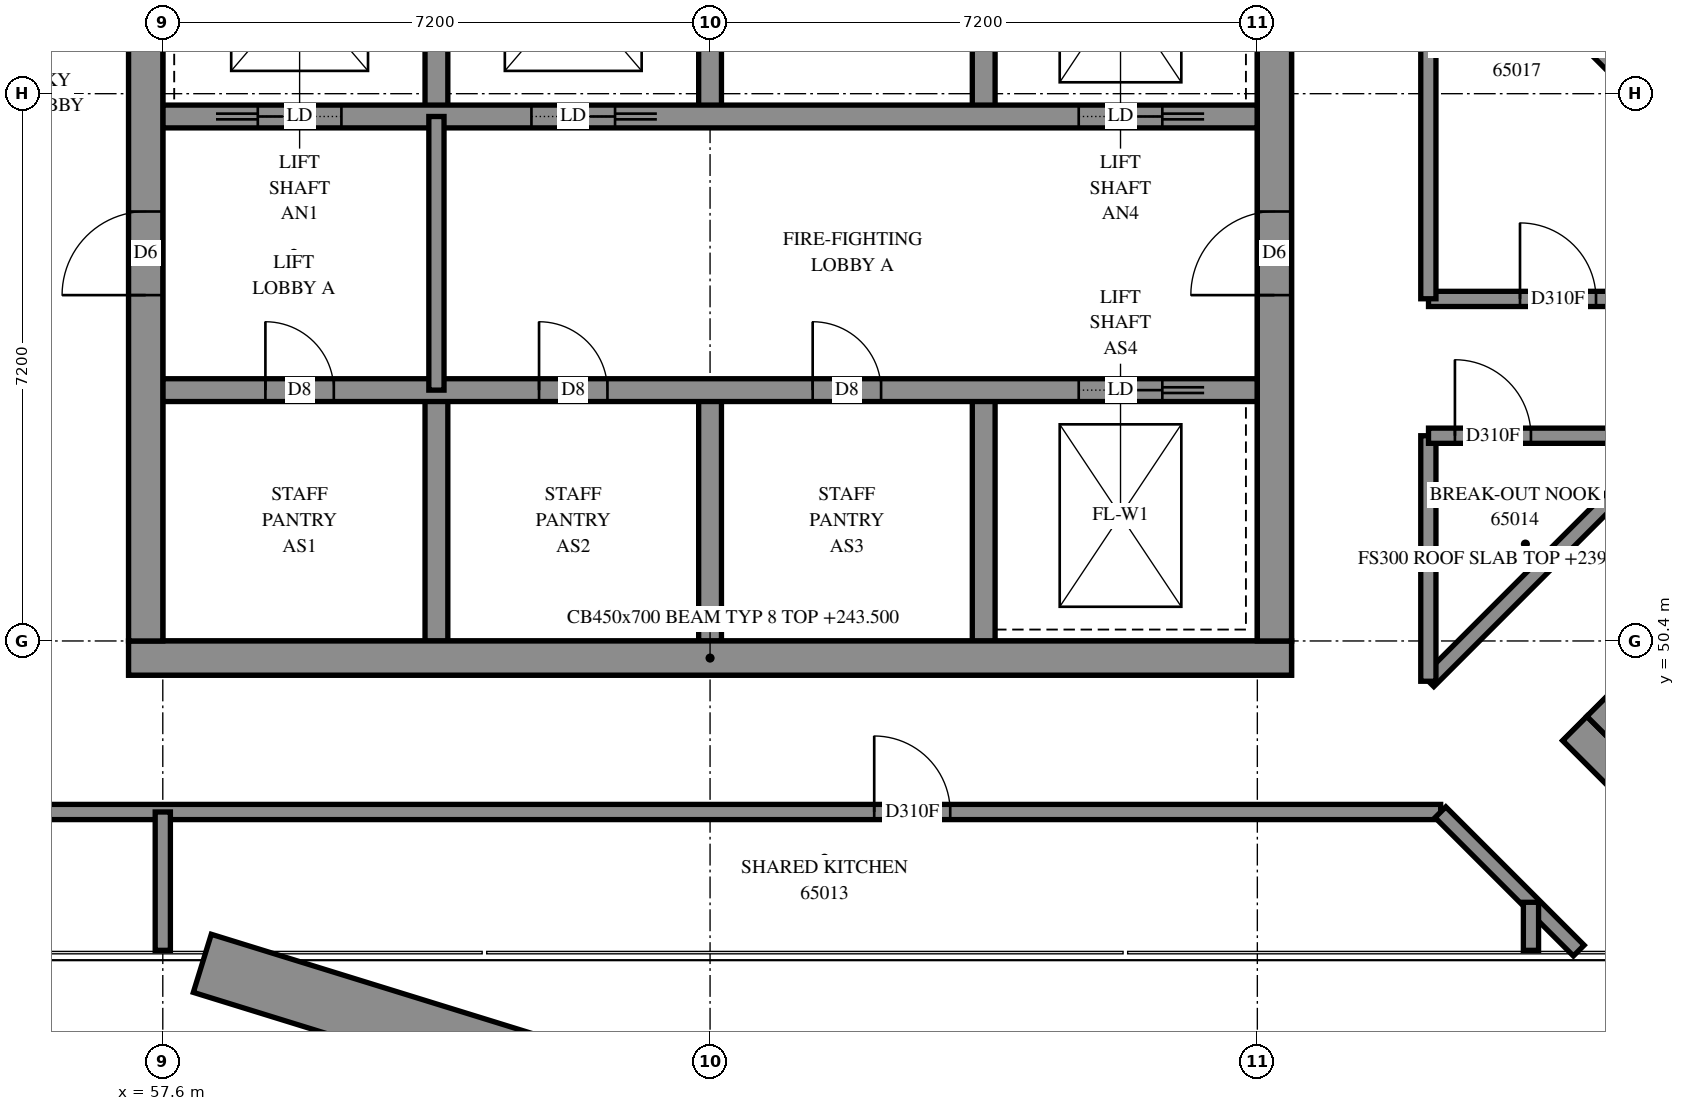
"""IFC4 building model, lengths in metres.
Left out: names, types, materials, properties, quantities, classifications, styles, units other than length and angle.
Written with IfcOpenShell. Run it as: python <this file> out.ifc"""

import sys

from ifc_helpers import new_model, si_unit, direction, frame, frame_2d, origin, place, context, subcontext, project, spatial, rectangle, extrude, element, fill, save


model = new_model("IFC4")
c1 = context("Model", 3, precision=1e-05, world=origin(), true_north=direction((0.0, 1.0)))
c2 = subcontext(c1, "Body", "Model", "MODEL_VIEW")
j1 = project(units=[si_unit("LENGTHUNIT", "METRE"), si_unit("PLANEANGLEUNIT", "RADIAN")], contexts=[c1])
p1 = place(None, origin())
s1 = spatial("IfcSite", under=j1, at=p1, CompositionType="ELEMENT")
p2 = place(p1, origin())
s2 = spatial("IfcBuilding", under=s1, at=p2, CompositionType="ELEMENT")
p3 = place(p2, frame((0.0, 0.0, 239.6)))
s3 = spatial("IfcBuildingStorey", under=s2, at=p3, CompositionType="ELEMENT", Elevation=239.6)
p4 = place(p3, frame((57.15, 50.175, -0.3), z_axis=(0.0, 0.0, 1.0), x_axis=(1.0, 0.0, 0.0)))
e1 = element("IfcWall", 1, at=p4, inside=s3, PredefinedType="SHEAR", context=c2, shape_type="SweptSolid", body=[
    extrude(rectangle(XDim=15.3, YDim=0.45, at=frame_2d((7.65, 0.0))), origin(), (0.0, 0.0, 1.0), 3.5),
])
p5 = place(p3, frame((57.375, 50.4, -0.3), z_axis=(0.0, 0.0, 1.0), x_axis=(0.0, 1.0, 0.0)))
e2 = element("IfcWall", 2, at=p5, inside=s3, PredefinedType="SHEAR", context=c2, shape_type="SweptSolid", body=[
    extrude(rectangle(XDim=14.4, YDim=0.45, at=frame_2d((7.2, 0.0))), origin(), (0.0, 0.0, 1.0), 3.5),
])
p6 = place(p5, frame((4.55, 0.0, 0.3)))
e3 = element("IfcOpeningElement", 3, at=p6, cuts=e2, PredefinedType="OPENING", context=c2, shape_type="SweptSolid", body=[
    extrude(rectangle(XDim=1.1, YDim=2.1, at=frame_2d((0.55, 1.05))), frame((0.0, 0.235, 0.0), z_axis=(0.0, -1.0, 0.0), x_axis=(1.0, 0.0, 0.0)), (0.0, 0.0, 1.0), 0.47),
])
p7 = place(p5, frame((11.35, 0.0, 0.3)))
e4 = element("IfcOpeningElement", 4, at=p7, cuts=e2, PredefinedType="OPENING", context=c2, shape_type="SweptSolid", body=[
    extrude(rectangle(XDim=1.1, YDim=2.1, at=frame_2d((0.55, 1.05))), frame((0.0, 0.235, 0.0), z_axis=(0.0, -1.0, 0.0), x_axis=(1.0, 0.0, 0.0)), (0.0, 0.0, 1.0), 0.47),
])
p8 = place(p3, frame((72.225, 50.4, -0.3), z_axis=(0.0, 0.0, 1.0), x_axis=(0.0, 1.0, 0.0)))
e5 = element("IfcWall", 5, at=p8, inside=s3, PredefinedType="SHEAR", context=c2, shape_type="SweptSolid", body=[
    extrude(rectangle(XDim=14.4, YDim=0.45, at=frame_2d((7.2, 0.0))), origin(), (0.0, 0.0, 1.0), 3.5),
])
p9 = place(p8, frame((4.55, 0.0, 0.3)))
e6 = element("IfcOpeningElement", 6, at=p9, cuts=e5, PredefinedType="OPENING", context=c2, shape_type="SweptSolid", body=[
    extrude(rectangle(XDim=1.1, YDim=2.1, at=frame_2d((0.55, 1.05))), frame((0.0, 0.235, 0.0), z_axis=(0.0, -1.0, 0.0), x_axis=(1.0, 0.0, 0.0)), (0.0, 0.0, 1.0), 0.47),
])
p10 = place(p8, frame((11.35, 0.0, 0.3)))
e7 = element("IfcOpeningElement", 7, at=p10, cuts=e5, PredefinedType="OPENING", context=c2, shape_type="SweptSolid", body=[
    extrude(rectangle(XDim=1.1, YDim=2.1, at=frame_2d((0.55, 1.05))), frame((0.0, 0.235, 0.0), z_axis=(0.0, -1.0, 0.0), x_axis=(1.0, 0.0, 0.0)), (0.0, 0.0, 1.0), 0.47),
])
for number, where, z_axis, x_axis in (
    (8, (61.2, 50.4, 0.0), (0.0, 0.0, 1.0), (0.0, 1.0, 0.0)),
    (9, (61.2, 57.3, 0.0), (0.0, 0.0, 1.0), (0.0, 1.0, 0.0)),
    (10, (64.8, 50.4, 0.0), (0.0, 0.0, 1.0), (0.0, 1.0, 0.0)),
    (11, (64.8, 57.3, 0.0), (0.0, 0.0, 1.0), (0.0, 1.0, 0.0)),
    (12, (68.4, 50.4, 0.0), (0.0, 0.0, 1.0), (0.0, 1.0, 0.0)),
    (13, (68.4, 57.3, 0.0), (0.0, 0.0, 1.0), (0.0, 1.0, 0.0)),
):
    element("IfcWall", number, at=place(p3, frame(where, z_axis=z_axis, x_axis=x_axis)), inside=s3, PredefinedType="SOLIDWALL", context=c2, shape_type="SweptSolid", body=[
        extrude(rectangle(XDim=3.3, YDim=0.3, at=frame_2d((1.65, 0.0))), origin(), (0.0, 0.0, 1.0), 3.9),
    ])
p11 = place(p3, frame((57.6, 53.7, 0.0), z_axis=(0.0, 0.0, 1.0), x_axis=(1.0, 0.0, 0.0)))
e14 = element("IfcWall", 14, at=p11, inside=s3, PredefinedType="SOLIDWALL", context=c2, shape_type="SweptSolid", body=[
    extrude(rectangle(XDim=14.4, YDim=0.3, at=frame_2d((7.2, 0.0))), origin(), (0.0, 0.0, 1.0), 3.9),
])
p12 = place(p11, frame((1.35, 0.0, 0.0)))
e15 = element("IfcOpeningElement", 15, at=p12, cuts=e14, PredefinedType="OPENING", context=c2, shape_type="SweptSolid", body=[
    extrude(rectangle(XDim=0.9, YDim=2.1, at=frame_2d((0.45, 1.05))), frame((0.0, 0.16, 0.0), z_axis=(0.0, -1.0, 0.0), x_axis=(1.0, 0.0, 0.0)), (0.0, 0.0, 1.0), 0.32),
])
p13 = place(p11, frame((4.95, 0.0, 0.0)))
e16 = element("IfcOpeningElement", 16, at=p13, cuts=e14, PredefinedType="OPENING", context=c2, shape_type="SweptSolid", body=[
    extrude(rectangle(XDim=0.9, YDim=2.1, at=frame_2d((0.45, 1.05))), frame((0.0, 0.16, 0.0), z_axis=(0.0, -1.0, 0.0), x_axis=(1.0, 0.0, 0.0)), (0.0, 0.0, 1.0), 0.32),
])
p14 = place(p11, frame((8.55, 0.0, 0.0)))
e17 = element("IfcOpeningElement", 17, at=p14, cuts=e14, PredefinedType="OPENING", context=c2, shape_type="SweptSolid", body=[
    extrude(rectangle(XDim=0.9, YDim=2.1, at=frame_2d((0.45, 1.05))), frame((0.0, 0.16, 0.0), z_axis=(0.0, -1.0, 0.0), x_axis=(1.0, 0.0, 0.0)), (0.0, 0.0, 1.0), 0.32),
])
p15 = place(p11, frame((12.05, 0.0, 0.0)))
e18 = element("IfcOpeningElement", 18, at=p15, cuts=e14, PredefinedType="OPENING", context=c2, shape_type="SweptSolid", body=[
    extrude(rectangle(XDim=1.1, YDim=2.1, at=frame_2d((0.55, 1.05))), frame((0.0, 0.16, 0.0), z_axis=(0.0, -1.0, 0.0), x_axis=(1.0, 0.0, 0.0)), (0.0, 0.0, 1.0), 0.32),
])
p16 = place(p3, frame((57.6, 57.3, 0.0), z_axis=(0.0, 0.0, 1.0), x_axis=(1.0, 0.0, 0.0)))
e19 = element("IfcWall", 19, at=p16, inside=s3, PredefinedType="SOLIDWALL", context=c2, shape_type="SweptSolid", body=[
    extrude(rectangle(XDim=14.4, YDim=0.3, at=frame_2d((7.2, 0.0))), origin(), (0.0, 0.0, 1.0), 3.9),
])
p17 = place(p16, frame((1.25, 0.0, 0.0)))
e20 = element("IfcOpeningElement", 20, at=p17, cuts=e19, PredefinedType="OPENING", context=c2, shape_type="SweptSolid", body=[
    extrude(rectangle(XDim=1.1, YDim=2.1, at=frame_2d((0.55, 1.05))), frame((0.0, 0.16, 0.0), z_axis=(0.0, -1.0, 0.0), x_axis=(1.0, 0.0, 0.0)), (0.0, 0.0, 1.0), 0.32),
])
p18 = place(p16, frame((4.85, 0.0, 0.0)))
e21 = element("IfcOpeningElement", 21, at=p18, cuts=e19, PredefinedType="OPENING", context=c2, shape_type="SweptSolid", body=[
    extrude(rectangle(XDim=1.1, YDim=2.1, at=frame_2d((0.55, 1.05))), frame((0.0, 0.16, 0.0), z_axis=(0.0, -1.0, 0.0), x_axis=(1.0, 0.0, 0.0)), (0.0, 0.0, 1.0), 0.32),
])
p19 = place(p16, frame((12.05, 0.0, 0.0)))
e22 = element("IfcOpeningElement", 22, at=p19, cuts=e19, PredefinedType="OPENING", context=c2, shape_type="SweptSolid", body=[
    extrude(rectangle(XDim=1.1, YDim=2.1, at=frame_2d((0.55, 1.05))), frame((0.0, 0.16, 0.0), z_axis=(0.0, -1.0, 0.0), x_axis=(1.0, 0.0, 0.0)), (0.0, 0.0, 1.0), 0.32),
])
p20 = place(p3, frame((76.177, 49.249, -0.3), z_axis=(0.0, 0.0, 1.0), x_axis=(0.7071100491, -0.7071035132, 0.0)))
e23 = element("IfcWall", 23, at=p20, inside=s3, PredefinedType="SHEAR", context=c2, shape_type="SweptSolid", body=[
    extrude(rectangle(XDim=15.3, YDim=0.45, at=frame_2d((7.65, 0.0))), origin(), (0.0, 0.0, 1.0), 3.5),
])
p21 = place(p3, frame((76.495, 49.249, -0.3), z_axis=(0.0, 0.0, 1.0), x_axis=(0.7071067812, 0.7071067812, 0.0)))
e24 = element("IfcWall", 24, at=p21, inside=s3, PredefinedType="SHEAR", context=c2, shape_type="SweptSolid", body=[
    extrude(rectangle(XDim=14.4, YDim=0.45, at=frame_2d((7.2, 0.0))), origin(), (0.0, 0.0, 1.0), 3.5),
])
p22 = place(p21, frame((4.55, 0.0, 0.3)))
e25 = element("IfcOpeningElement", 25, at=p22, cuts=e24, PredefinedType="OPENING", context=c2, shape_type="SweptSolid", body=[
    extrude(rectangle(XDim=1.1, YDim=2.1, at=frame_2d((0.55, 1.05))), frame((0.0, 0.235, 0.0), z_axis=(0.0, -1.0, 0.0), x_axis=(1.0, 0.0, 0.0)), (0.0, 0.0, 1.0), 0.47),
])
p23 = place(p21, frame((11.35, 0.0, 0.3)))
e26 = element("IfcOpeningElement", 26, at=p23, cuts=e24, PredefinedType="OPENING", context=c2, shape_type="SweptSolid", body=[
    extrude(rectangle(XDim=1.1, YDim=2.1, at=frame_2d((0.55, 1.05))), frame((0.0, 0.235, 0.0), z_axis=(0.0, -1.0, 0.0), x_axis=(1.0, 0.0, 0.0)), (0.0, 0.0, 1.0), 0.47),
])
p24 = place(p3, frame((62.8, 44.712, 0.0), z_axis=(0.0, 0.0, 1.0), x_axis=(-0.9553591731, 0.2954468656, 0.0)))
e27 = element("IfcWall", 27, at=p24, inside=s3, PredefinedType="SOLIDWALL", context=c2, shape_type="SweptSolid", body=[
    extrude(rectangle(XDim=4.899, YDim=0.8, at=frame_2d((2.449, 0.0))), origin(), (0.0, 0.0, 1.0), 0.65),
])
p25 = place(p3, frame((61.2, 53.7, 0.0), z_axis=(0.0, 0.0, 1.0), x_axis=(0.0, 1.0, 0.0)))
e28 = element("IfcWall", 28, at=p25, inside=s3, PredefinedType="PARTITIONING", context=c2, shape_type="SweptSolid", body=[
    extrude(rectangle(XDim=3.6, YDim=0.2, at=frame_2d((1.8, 0.0))), origin(), (0.0, 0.0, 1.0), 3.9),
])
p26 = place(p3, frame((55.352, 48.15, 0.0), z_axis=(0.0, 0.0, 1.0), x_axis=(1.0, 0.0, 0.0)))
e29 = element("IfcWall", 29, at=p26, inside=s3, PredefinedType="PARTITIONING", context=c2, shape_type="SweptSolid", body=[
    extrude(rectangle(XDim=19.06, YDim=0.2, at=frame_2d((9.53, 0.0))), origin(), (0.0, 0.0, 1.0), 3.9),
])
p27 = place(p26, frame((11.608, 0.0, 0.0)))
e30 = element("IfcOpeningElement", 30, at=p27, cuts=e29, PredefinedType="OPENING", context=c2, shape_type="SweptSolid", body=[
    extrude(rectangle(XDim=1.0, YDim=2.1, at=frame_2d((0.5, 1.05))), frame((0.0, 0.11, 0.0), z_axis=(0.0, -1.0, 0.0), x_axis=(1.0, 0.0, 0.0)), (0.0, 0.0, 1.0), 0.22),
])
p28 = place(p3, frame((74.252, 54.9, 0.0), z_axis=(0.0, 0.0, 1.0), x_axis=(1.0, 0.0, 0.0)))
e31 = element("IfcWall", 31, at=p28, inside=s3, PredefinedType="PARTITIONING", context=c2, shape_type="SweptSolid", body=[
    extrude(rectangle(XDim=5.5, YDim=0.2, at=frame_2d((2.75, 0.0))), origin(), (0.0, 0.0, 1.0), 3.9),
])
p29 = place(p28, frame((1.204, 0.0, 0.0)))
e32 = element("IfcOpeningElement", 32, at=p29, cuts=e31, PredefinedType="OPENING", context=c2, shape_type="SweptSolid", body=[
    extrude(rectangle(XDim=1.0, YDim=2.1, at=frame_2d((0.5, 1.05))), frame((0.0, 0.11, 0.0), z_axis=(0.0, -1.0, 0.0), x_axis=(1.0, 0.0, 0.0)), (0.0, 0.0, 1.0), 0.22),
])
p30 = place(p3, frame((74.25, 54.902, 0.0), z_axis=(0.0, 0.0, 1.0), x_axis=(0.0, 1.0, 0.0)))
e33 = element("IfcWall", 33, at=p30, inside=s3, PredefinedType="PARTITIONING", context=c2, shape_type="SweptSolid", body=[
    extrude(rectangle(XDim=5.5, YDim=0.2, at=frame_2d((2.75, 0.0))), origin(), (0.0, 0.0, 1.0), 3.9),
])
p31 = place(p3, frame((74.251, 49.87, 0.0), z_axis=(0.0, 0.0, 1.0), x_axis=(0.7071067812, 0.7071067812, 0.0)))
e34 = element("IfcWall", 34, at=p31, inside=s3, PredefinedType="PARTITIONING", context=c2, shape_type="SweptSolid", body=[
    extrude(rectangle(XDim=4.565, YDim=0.2, at=frame_2d((2.283, 0.0))), origin(), (0.0, 0.0, 1.0), 3.9),
])
p32 = place(p3, frame((74.447, 60.201, 0.0), z_axis=(0.0, 0.0, 1.0), x_axis=(0.7071067812, -0.7071067812, 0.0)))
e35 = element("IfcWall", 35, at=p32, inside=s3, PredefinedType="PARTITIONING", context=c2, shape_type="SweptSolid", body=[
    extrude(rectangle(XDim=4.384, YDim=0.2, at=frame_2d((2.192, 0.0))), origin(), (0.0, 0.0, 1.0), 3.9),
])
p33 = place(p3, frame((74.25, 49.87, 0.0), z_axis=(0.0, 0.0, 1.0), x_axis=(0.0, 1.0, 0.0)))
e36 = element("IfcWall", 36, at=p33, inside=s3, PredefinedType="PARTITIONING", context=c2, shape_type="SweptSolid", body=[
    extrude(rectangle(XDim=3.23, YDim=0.2, at=frame_2d((1.615, 0.0))), origin(), (0.0, 0.0, 1.0), 3.9),
])
p34 = place(p3, frame((74.252, 53.1, 0.0), z_axis=(0.0, 0.0, 1.0), x_axis=(1.0, 0.0, 0.0)))
e37 = element("IfcWall", 37, at=p34, inside=s3, PredefinedType="PARTITIONING", context=c2, shape_type="SweptSolid", body=[
    extrude(rectangle(XDim=3.228, YDim=0.2, at=frame_2d((1.614, 0.0))), origin(), (0.0, 0.0, 1.0), 3.9),
])
p35 = place(p34, frame((0.347, 0.0, 0.0)))
e38 = element("IfcOpeningElement", 38, at=p35, cuts=e37, PredefinedType="OPENING", context=c2, shape_type="SweptSolid", body=[
    extrude(rectangle(XDim=1.0, YDim=2.1, at=frame_2d((0.5, 1.05))), frame((0.0, 0.11, 0.0), z_axis=(0.0, -1.0, 0.0), x_axis=(1.0, 0.0, 0.0)), (0.0, 0.0, 1.0), 0.22),
])
p36 = place(p3, frame((74.409, 48.147, 0.0), z_axis=(0.0, 0.0, 1.0), x_axis=(0.7071067812, -0.7071067812, 0.0)))
e39 = element("IfcWall", 39, at=p36, inside=s3, PredefinedType="PARTITIONING", context=c2, shape_type="SweptSolid", body=[
    extrude(rectangle(XDim=2.574, YDim=0.2, at=frame_2d((1.287, 0.0))), origin(), (0.0, 0.0, 1.0), 3.9),
])
p37 = place(p3, frame((57.6, 46.33, 0.0), z_axis=(0.0, 0.0, 1.0), x_axis=(0.0, 1.0, 0.0)))
e40 = element("IfcWall", 40, at=p37, inside=s3, PredefinedType="PARTITIONING", context=c2, shape_type="SweptSolid", body=[
    extrude(rectangle(XDim=1.82, YDim=0.2, at=frame_2d((0.91, 0.0))), origin(), (0.0, 0.0, 1.0), 3.9),
])
p38 = place(p3, frame((75.6, 46.33, 0.0), z_axis=(0.0, 0.0, 1.0), x_axis=(0.0, 1.0, 0.0)))
e41 = element("IfcWall", 41, at=p38, inside=s3, PredefinedType="PARTITIONING", context=c2, shape_type="SweptSolid", body=[
    extrude(rectangle(XDim=0.632, YDim=0.2, at=frame_2d((0.316, 0.0))), origin(), (0.0, 0.0, 1.0), 3.9),
])
p39 = place(p6, origin())
e42 = element("IfcDoor", 42, at=p39, inside=s3, OperationType="DOUBLE_DOOR_SINGLE_SWING", PredefinedType="DOOR", context=c2, shape_type="SweptSolid", body=[
    extrude(rectangle(XDim=1.1, YDim=2.1, at=frame_2d((0.55, 1.05))), frame((0.0, 0.025, 0.0), z_axis=(0.0, -1.0, 0.0), x_axis=(1.0, 0.0, 0.0)), (0.0, 0.0, 1.0), 0.05),
])
fill(e3, e42)
p40 = place(p9, origin())
e43 = element("IfcDoor", 43, at=p40, inside=s3, OperationType="DOUBLE_DOOR_SINGLE_SWING", PredefinedType="DOOR", context=c2, shape_type="SweptSolid", body=[
    extrude(rectangle(XDim=1.1, YDim=2.1, at=frame_2d((0.55, 1.05))), frame((0.0, 0.025, 0.0), z_axis=(0.0, -1.0, 0.0), x_axis=(1.0, 0.0, 0.0)), (0.0, 0.0, 1.0), 0.05),
])
fill(e6, e43)
p41 = place(p12, origin())
e44 = element("IfcDoor", 44, at=p41, inside=s3, OperationType="SINGLE_SWING_LEFT", PredefinedType="DOOR", context=c2, shape_type="SweptSolid", body=[
    extrude(rectangle(XDim=0.9, YDim=2.1, at=frame_2d((0.45, 1.05))), frame((0.0, 0.025, 0.0), z_axis=(0.0, -1.0, 0.0), x_axis=(1.0, 0.0, 0.0)), (0.0, 0.0, 1.0), 0.05),
])
fill(e15, e44)
p42 = place(p13, origin())
e45 = element("IfcDoor", 45, at=p42, inside=s3, OperationType="SINGLE_SWING_LEFT", PredefinedType="DOOR", context=c2, shape_type="SweptSolid", body=[
    extrude(rectangle(XDim=0.9, YDim=2.1, at=frame_2d((0.45, 1.05))), frame((0.0, 0.025, 0.0), z_axis=(0.0, -1.0, 0.0), x_axis=(1.0, 0.0, 0.0)), (0.0, 0.0, 1.0), 0.05),
])
fill(e16, e45)
p43 = place(p14, origin())
e46 = element("IfcDoor", 46, at=p43, inside=s3, OperationType="SINGLE_SWING_LEFT", PredefinedType="DOOR", context=c2, shape_type="SweptSolid", body=[
    extrude(rectangle(XDim=0.9, YDim=2.1, at=frame_2d((0.45, 1.05))), frame((0.0, 0.025, 0.0), z_axis=(0.0, -1.0, 0.0), x_axis=(1.0, 0.0, 0.0)), (0.0, 0.0, 1.0), 0.05),
])
fill(e17, e46)
p44 = place(p15, origin())
e47 = element("IfcDoor", 47, at=p44, inside=s3, OperationType="SLIDING_TO_RIGHT", PredefinedType="DOOR", context=c2, shape_type="SweptSolid", body=[
    extrude(rectangle(XDim=1.1, YDim=2.1, at=frame_2d((0.55, 1.05))), frame((0.0, 0.025, 0.0), z_axis=(0.0, -1.0, 0.0), x_axis=(1.0, 0.0, 0.0)), (0.0, 0.0, 1.0), 0.05),
])
fill(e18, e47)
p45 = place(p17, origin())
e48 = element("IfcDoor", 48, at=p45, inside=s3, OperationType="SLIDING_TO_LEFT", PredefinedType="DOOR", context=c2, shape_type="SweptSolid", body=[
    extrude(rectangle(XDim=1.1, YDim=2.1, at=frame_2d((0.55, 1.05))), frame((0.0, 0.025, 0.0), z_axis=(0.0, -1.0, 0.0), x_axis=(1.0, 0.0, 0.0)), (0.0, 0.0, 1.0), 0.05),
])
fill(e20, e48)
p46 = place(p18, origin())
e49 = element("IfcDoor", 49, at=p46, inside=s3, OperationType="SLIDING_TO_RIGHT", PredefinedType="DOOR", context=c2, shape_type="SweptSolid", body=[
    extrude(rectangle(XDim=1.1, YDim=2.1, at=frame_2d((0.55, 1.05))), frame((0.0, 0.025, 0.0), z_axis=(0.0, -1.0, 0.0), x_axis=(1.0, 0.0, 0.0)), (0.0, 0.0, 1.0), 0.05),
])
fill(e21, e49)
p47 = place(p19, origin())
e50 = element("IfcDoor", 50, at=p47, inside=s3, OperationType="SLIDING_TO_RIGHT", PredefinedType="DOOR", context=c2, shape_type="SweptSolid", body=[
    extrude(rectangle(XDim=1.1, YDim=2.1, at=frame_2d((0.55, 1.05))), frame((0.0, 0.025, 0.0), z_axis=(0.0, -1.0, 0.0), x_axis=(1.0, 0.0, 0.0)), (0.0, 0.0, 1.0), 0.05),
])
fill(e22, e50)
p48 = place(p27, origin())
e51 = element("IfcDoor", 51, at=p48, inside=s3, OperationType="SINGLE_SWING_LEFT", PredefinedType="DOOR", context=c2, shape_type="SweptSolid", body=[
    extrude(rectangle(XDim=1.0, YDim=2.1, at=frame_2d((0.5, 1.05))), frame((0.0, 0.025, 0.0), z_axis=(0.0, -1.0, 0.0), x_axis=(1.0, 0.0, 0.0)), (0.0, 0.0, 1.0), 0.05),
])
fill(e30, e51)
p49 = place(p35, origin())
e52 = element("IfcDoor", 52, at=p49, inside=s3, OperationType="SINGLE_SWING_RIGHT", PredefinedType="DOOR", context=c2, shape_type="SweptSolid", body=[
    extrude(rectangle(XDim=1.0, YDim=2.1, at=frame_2d((0.5, 1.05))), frame((0.0, 0.025, 0.0), z_axis=(0.0, -1.0, 0.0), x_axis=(1.0, 0.0, 0.0)), (0.0, 0.0, 1.0), 0.05),
])
fill(e38, e52)
p50 = place(p29, origin())
e53 = element("IfcDoor", 53, at=p50, inside=s3, OperationType="SINGLE_SWING_LEFT", PredefinedType="DOOR", context=c2, shape_type="SweptSolid", body=[
    extrude(rectangle(XDim=1.0, YDim=2.1, at=frame_2d((0.5, 1.05))), frame((0.0, 0.025, 0.0), z_axis=(0.0, -1.0, 0.0), x_axis=(1.0, 0.0, 0.0)), (0.0, 0.0, 1.0), 0.05),
])
fill(e32, e53)
save(model, sys.argv[1])
